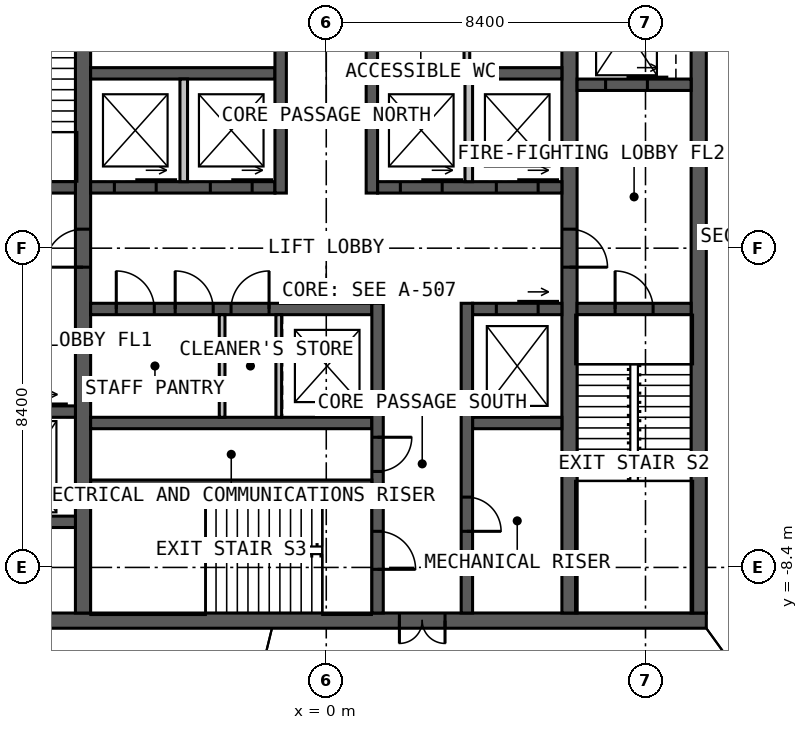
"""IFC4 building model, lengths in metres.
Left out: names, types, materials, properties, quantities, classifications, styles, units other than length and angle.
Written with IfcOpenShell. Run it as: python <this file> out.ifc"""

import sys

from ifc_helpers import new_model, si_unit, direction, frame, frame_2d, origin, place, context, subcontext, project, spatial, rectangle, extrude, element, fill, save


model = new_model("IFC4")
c1 = context("Model", 3, precision=1e-05, world=origin(), true_north=direction((0.0, 1.0)))
c2 = subcontext(c1, "Body", "Model", "MODEL_VIEW")
j1 = project(units=[si_unit("LENGTHUNIT", "METRE"), si_unit("PLANEANGLEUNIT", "RADIAN")], contexts=[c1])
p1 = place(None, origin())
s1 = spatial("IfcSite", under=j1, at=p1, CompositionType="ELEMENT")
p2 = place(p1, origin())
s2 = spatial("IfcBuilding", under=s1, at=p2, CompositionType="ELEMENT")
p3 = place(p2, frame((0.0, 0.0, 236.0)))
s3 = spatial("IfcBuildingStorey", under=s2, at=p3, CompositionType="ELEMENT", Elevation=236.0)
p4 = place(p3, frame((10.0, -9.8, 0.0), z_axis=(0.0, 0.0, 1.0), x_axis=(-1.0, 0.0, 0.0)))
e1 = element("IfcWall", 1, at=p4, inside=s3, PredefinedType="SOLIDWALL", context=c2, shape_type="SweptSolid", body=[
    extrude(rectangle(XDim=20.0, YDim=0.4, at=frame_2d((10.0, 0.0))), origin(), (0.0, 0.0, 1.0), 4.0),
])
p5 = place(p4, frame((6.875, 0.0, 0.0)))
e2 = element("IfcOpeningElement", 2, at=p5, cuts=e1, PredefinedType="OPENING", context=c2, shape_type="SweptSolid", body=[
    extrude(rectangle(XDim=1.2, YDim=2.2, at=frame_2d((0.6, 1.1))), frame((0.0, 0.21, 0.0), z_axis=(0.0, -1.0, 0.0), x_axis=(1.0, 0.0, 0.0)), (0.0, 0.0, 1.0), 0.42),
])
p6 = place(p3, frame((9.8, -9.6, 0.0), z_axis=(0.0, 0.0, 1.0), x_axis=(0.0, 1.0, 0.0)))
e3 = element("IfcWall", 3, at=p6, inside=s3, PredefinedType="SOLIDWALL", context=c2, shape_type="SweptSolid", body=[
    extrude(rectangle(XDim=19.2, YDim=0.4, at=frame_2d((9.6, 0.0))), origin(), (0.0, 0.0, 1.0), 4.0),
])
p7 = place(p3, frame((-6.4, -9.6, 0.0), z_axis=(0.0, 0.0, 1.0), x_axis=(0.0, 1.0, 0.0)))
e4 = element("IfcWall", 4, at=p7, inside=s3, PredefinedType="SOLIDWALL", context=c2, shape_type="SweptSolid", body=[
    extrude(rectangle(XDim=19.2, YDim=0.4, at=frame_2d((9.6, 0.0))), origin(), (0.0, 0.0, 1.0), 4.0),
])
p8 = place(p7, frame((9.1, 0.0, 0.0)))
e5 = element("IfcOpeningElement", 5, at=p8, cuts=e4, PredefinedType="OPENING", context=c2, shape_type="SweptSolid", body=[
    extrude(rectangle(XDim=1.0, YDim=2.2, at=frame_2d((0.5, 1.1))), frame((0.0, 0.21, 0.0), z_axis=(0.0, -1.0, 0.0), x_axis=(1.0, 0.0, 0.0)), (0.0, 0.0, 1.0), 0.42),
])
p9 = place(p3, frame((6.4, 9.6, 0.0), z_axis=(0.0, 0.0, 1.0), x_axis=(0.0, -1.0, 0.0)))
e6 = element("IfcWall", 6, at=p9, inside=s3, PredefinedType="SOLIDWALL", context=c2, shape_type="SweptSolid", body=[
    extrude(rectangle(XDim=19.2, YDim=0.4, at=frame_2d((9.6, 0.0))), origin(), (0.0, 0.0, 1.0), 4.0),
])
p10 = place(p9, frame((9.1, 0.0, 0.0)))
e7 = element("IfcOpeningElement", 7, at=p10, cuts=e6, PredefinedType="OPENING", context=c2, shape_type="SweptSolid", body=[
    extrude(rectangle(XDim=1.0, YDim=2.2, at=frame_2d((0.5, 1.1))), frame((0.0, 0.21, 0.0), z_axis=(0.0, -1.0, 0.0), x_axis=(1.0, 0.0, 0.0)), (0.0, 0.0, 1.0), 0.42),
])
p11 = place(p3, frame((-6.2, 1.6, 0.0), z_axis=(0.0, 0.0, 1.0), x_axis=(1.0, 0.0, 0.0)))
e8 = element("IfcWall", 8, at=p11, inside=s3, PredefinedType="SOLIDWALL", context=c2, shape_type="SweptSolid", body=[
    extrude(rectangle(XDim=4.85, YDim=0.3, at=frame_2d((2.425, 0.0))), origin(), (0.0, 0.0, 1.0), 4.0),
])
p12 = place(p11, frame((0.625, 0.0, 0.0)))
e9 = element("IfcOpeningElement", 9, at=p12, cuts=e8, PredefinedType="OPENING", context=c2, shape_type="SweptSolid", body=[
    extrude(rectangle(XDim=1.1, YDim=2.2, at=frame_2d((0.55, 1.1))), frame((0.0, 0.16, 0.0), z_axis=(0.0, -1.0, 0.0), x_axis=(1.0, 0.0, 0.0)), (0.0, 0.0, 1.0), 0.32),
])
p13 = place(p11, frame((3.15, 0.0, 0.0)))
e10 = element("IfcOpeningElement", 10, at=p13, cuts=e8, PredefinedType="OPENING", context=c2, shape_type="SweptSolid", body=[
    extrude(rectangle(XDim=1.1, YDim=2.2, at=frame_2d((0.55, 1.1))), frame((0.0, 0.16, 0.0), z_axis=(0.0, -1.0, 0.0), x_axis=(1.0, 0.0, 0.0)), (0.0, 0.0, 1.0), 0.32),
])
p14 = place(p3, frame((1.35, 1.6, 0.0), z_axis=(0.0, 0.0, 1.0), x_axis=(1.0, 0.0, 0.0)))
e11 = element("IfcWall", 11, at=p14, inside=s3, PredefinedType="SOLIDWALL", context=c2, shape_type="SweptSolid", body=[
    extrude(rectangle(XDim=4.85, YDim=0.3, at=frame_2d((2.425, 0.0))), origin(), (0.0, 0.0, 1.0), 4.0),
])
p15 = place(p14, frame((0.6, 0.0, 0.0)))
e12 = element("IfcOpeningElement", 12, at=p15, cuts=e11, PredefinedType="OPENING", context=c2, shape_type="SweptSolid", body=[
    extrude(rectangle(XDim=1.1, YDim=2.2, at=frame_2d((0.55, 1.1))), frame((0.0, 0.16, 0.0), z_axis=(0.0, -1.0, 0.0), x_axis=(1.0, 0.0, 0.0)), (0.0, 0.0, 1.0), 0.32),
])
p16 = place(p14, frame((3.125, 0.0, 0.0)))
e13 = element("IfcOpeningElement", 13, at=p16, cuts=e11, PredefinedType="OPENING", context=c2, shape_type="SweptSolid", body=[
    extrude(rectangle(XDim=1.1, YDim=2.2, at=frame_2d((0.55, 1.1))), frame((0.0, 0.16, 0.0), z_axis=(0.0, -1.0, 0.0), x_axis=(1.0, 0.0, 0.0)), (0.0, 0.0, 1.0), 0.32),
])
for number, where, z_axis, x_axis in (
    (14, (-6.2, 4.6, 0.0), (0.0, 0.0, 1.0), (1.0, 0.0, 0.0)),
    (15, (1.35, 4.6, 0.0), (0.0, 0.0, 1.0), (1.0, 0.0, 0.0)),
):
    element("IfcWall", number, at=place(p3, frame(where, z_axis=z_axis, x_axis=x_axis)), inside=s3, PredefinedType="SOLIDWALL", context=c2, shape_type="SweptSolid", body=[
        extrude(rectangle(XDim=4.85, YDim=0.3, at=frame_2d((2.425, 0.0))), origin(), (0.0, 0.0, 1.0), 4.0),
    ])
p17 = place(p3, frame((-1.2, 1.45, 0.0), z_axis=(0.0, 0.0, 1.0), x_axis=(0.0, 1.0, 0.0)))
e16 = element("IfcWall", 16, at=p17, inside=s3, PredefinedType="SOLIDWALL", context=c2, shape_type="SweptSolid", body=[
    extrude(rectangle(XDim=8.15, YDim=0.3, at=frame_2d((4.075, 0.0))), origin(), (0.0, 0.0, 1.0), 4.0),
])
p18 = place(p17, frame((5.05, 0.0, 0.0)))
e17 = element("IfcOpeningElement", 17, at=p18, cuts=e16, PredefinedType="OPENING", context=c2, shape_type="SweptSolid", body=[
    extrude(rectangle(XDim=1.0, YDim=2.2, at=frame_2d((0.5, 1.1))), frame((0.0, 0.16, 0.0), z_axis=(0.0, -1.0, 0.0), x_axis=(1.0, 0.0, 0.0)), (0.0, 0.0, 1.0), 0.32),
])
p19 = place(p3, frame((1.2, 1.45, 0.0), z_axis=(0.0, 0.0, 1.0), x_axis=(0.0, 1.0, 0.0)))
e18 = element("IfcWall", 18, at=p19, inside=s3, PredefinedType="SOLIDWALL", context=c2, shape_type="SweptSolid", body=[
    extrude(rectangle(XDim=8.15, YDim=0.3, at=frame_2d((4.075, 0.0))), origin(), (0.0, 0.0, 1.0), 4.0),
])
p20 = place(p19, frame((3.8, 0.0, 0.0)))
e19 = element("IfcOpeningElement", 19, at=p20, cuts=e18, PredefinedType="OPENING", context=c2, shape_type="SweptSolid", body=[
    extrude(rectangle(XDim=1.0, YDim=2.2, at=frame_2d((0.5, 1.1))), frame((0.0, 0.16, 0.0), z_axis=(0.0, -1.0, 0.0), x_axis=(1.0, 0.0, 0.0)), (0.0, 0.0, 1.0), 0.32),
])
p21 = place(p19, frame((6.15, 0.0, 0.0)))
e20 = element("IfcOpeningElement", 20, at=p21, cuts=e18, PredefinedType="OPENING", context=c2, shape_type="SweptSolid", body=[
    extrude(rectangle(XDim=1.0, YDim=2.2, at=frame_2d((0.5, 1.1))), frame((0.0, 0.16, 0.0), z_axis=(0.0, -1.0, 0.0), x_axis=(1.0, 0.0, 0.0)), (0.0, 0.0, 1.0), 0.32),
])
p22 = place(p3, frame((-6.2, -1.6, 0.0), z_axis=(0.0, 0.0, 1.0), x_axis=(1.0, 0.0, 0.0)))
e21 = element("IfcWall", 21, at=p22, inside=s3, PredefinedType="SOLIDWALL", context=c2, shape_type="SweptSolid", body=[
    extrude(rectangle(XDim=7.4, YDim=0.3, at=frame_2d((3.7, 0.0))), origin(), (0.0, 0.0, 1.0), 4.0),
])
p23 = place(p22, frame((0.675, 0.0, 0.0)))
e22 = element("IfcOpeningElement", 22, at=p23, cuts=e21, PredefinedType="OPENING", context=c2, shape_type="SweptSolid", body=[
    extrude(rectangle(XDim=1.0, YDim=2.2, at=frame_2d((0.5, 1.1))), frame((0.0, 0.16, 0.0), z_axis=(0.0, -1.0, 0.0), x_axis=(1.0, 0.0, 0.0)), (0.0, 0.0, 1.0), 0.32),
])
p24 = place(p22, frame((2.225, 0.0, 0.0)))
e23 = element("IfcOpeningElement", 23, at=p24, cuts=e21, PredefinedType="OPENING", context=c2, shape_type="SweptSolid", body=[
    extrude(rectangle(XDim=1.0, YDim=2.2, at=frame_2d((0.5, 1.1))), frame((0.0, 0.16, 0.0), z_axis=(0.0, -1.0, 0.0), x_axis=(1.0, 0.0, 0.0)), (0.0, 0.0, 1.0), 0.32),
])
p25 = place(p22, frame((3.695, 0.0, 0.0)))
e24 = element("IfcOpeningElement", 24, at=p25, cuts=e21, PredefinedType="OPENING", context=c2, shape_type="SweptSolid", body=[
    extrude(rectangle(XDim=1.0, YDim=2.2, at=frame_2d((0.5, 1.1))), frame((0.0, 0.16, 0.0), z_axis=(0.0, -1.0, 0.0), x_axis=(1.0, 0.0, 0.0)), (0.0, 0.0, 1.0), 0.32),
])
p26 = place(p3, frame((3.85, -1.6, 0.0), z_axis=(0.0, 0.0, 1.0), x_axis=(1.0, 0.0, 0.0)))
e25 = element("IfcWall", 25, at=p26, inside=s3, PredefinedType="SOLIDWALL", context=c2, shape_type="SweptSolid", body=[
    extrude(rectangle(XDim=2.35, YDim=0.3, at=frame_2d((1.175, 0.0))), origin(), (0.0, 0.0, 1.0), 4.0),
])
p27 = place(p26, frame((0.625, 0.0, 0.0)))
e26 = element("IfcOpeningElement", 26, at=p27, cuts=e25, PredefinedType="OPENING", context=c2, shape_type="SweptSolid", body=[
    extrude(rectangle(XDim=1.1, YDim=2.2, at=frame_2d((0.55, 1.1))), frame((0.0, 0.16, 0.0), z_axis=(0.0, -1.0, 0.0), x_axis=(1.0, 0.0, 0.0)), (0.0, 0.0, 1.0), 0.32),
])
p28 = place(p3, frame((-6.2, -4.6, 0.0), z_axis=(0.0, 0.0, 1.0), x_axis=(1.0, 0.0, 0.0)))
e27 = element("IfcWall", 27, at=p28, inside=s3, PredefinedType="SOLIDWALL", context=c2, shape_type="SweptSolid", body=[
    extrude(rectangle(XDim=7.4, YDim=0.3, at=frame_2d((3.7, 0.0))), origin(), (0.0, 0.0, 1.0), 4.0),
])
p29 = place(p3, frame((3.85, -4.6, 0.0), z_axis=(0.0, 0.0, 1.0), x_axis=(1.0, 0.0, 0.0)))
e28 = element("IfcWall", 28, at=p29, inside=s3, PredefinedType="SOLIDWALL", context=c2, shape_type="SweptSolid", body=[
    extrude(rectangle(XDim=2.35, YDim=0.3, at=frame_2d((1.175, 0.0))), origin(), (0.0, 0.0, 1.0), 4.0),
])
p30 = place(p3, frame((1.35, -1.45, 0.0), z_axis=(0.0, 0.0, 1.0), x_axis=(0.0, -1.0, 0.0)))
e29 = element("IfcWall", 29, at=p30, inside=s3, PredefinedType="SOLIDWALL", context=c2, shape_type="SweptSolid", body=[
    extrude(rectangle(XDim=8.15, YDim=0.3, at=frame_2d((4.075, 0.0))), origin(), (0.0, 0.0, 1.0), 4.0),
])
p31 = place(p30, frame((6.0, 0.0, 0.0)))
e30 = element("IfcOpeningElement", 30, at=p31, cuts=e29, PredefinedType="OPENING", context=c2, shape_type="SweptSolid", body=[
    extrude(rectangle(XDim=1.0, YDim=2.2, at=frame_2d((0.5, 1.1))), frame((0.0, 0.16, 0.0), z_axis=(0.0, -1.0, 0.0), x_axis=(1.0, 0.0, 0.0)), (0.0, 0.0, 1.0), 0.32),
])
p32 = place(p30, frame((3.525, 0.0, 0.0)))
e31 = element("IfcOpeningElement", 31, at=p32, cuts=e29, PredefinedType="OPENING", context=c2, shape_type="SweptSolid", body=[
    extrude(rectangle(XDim=0.9, YDim=2.2, at=frame_2d((0.45, 1.1))), frame((0.0, 0.16, 0.0), z_axis=(0.0, -1.0, 0.0), x_axis=(1.0, 0.0, 0.0)), (0.0, 0.0, 1.0), 0.32),
])
p33 = place(p3, frame((3.7, -1.45, 0.0), z_axis=(0.0, 0.0, 1.0), x_axis=(0.0, -1.0, 0.0)))
e32 = element("IfcWall", 32, at=p33, inside=s3, PredefinedType="SOLIDWALL", context=c2, shape_type="SweptSolid", body=[
    extrude(rectangle(XDim=8.15, YDim=0.3, at=frame_2d((4.075, 0.0))), origin(), (0.0, 0.0, 1.0), 4.0),
])
p34 = place(p33, frame((5.1, 0.0, 0.0)))
e33 = element("IfcOpeningElement", 33, at=p34, cuts=e32, PredefinedType="OPENING", context=c2, shape_type="SweptSolid", body=[
    extrude(rectangle(XDim=0.9, YDim=2.2, at=frame_2d((0.45, 1.1))), frame((0.0, 0.16, 0.0), z_axis=(0.0, -1.0, 0.0), x_axis=(1.0, 0.0, 0.0)), (0.0, 0.0, 1.0), 0.32),
])
p35 = place(p3, frame((-6.2, -6.2, 0.0), z_axis=(0.0, 0.0, 1.0), x_axis=(1.0, 0.0, 0.0)))
e34 = element("IfcWall", 34, at=p35, inside=s3, PredefinedType="SOLIDWALL", context=c2, shape_type="SweptSolid", body=[
    extrude(rectangle(XDim=7.4, YDim=0.2, at=frame_2d((3.7, 0.0))), origin(), (0.0, 0.0, 1.0), 4.0),
])
p36 = place(p3, frame((-9.6, 1.6, 0.0), z_axis=(0.0, 0.0, 1.0), x_axis=(1.0, 0.0, 0.0)))
e35 = element("IfcWall", 35, at=p36, inside=s3, PredefinedType="SOLIDWALL", context=c2, shape_type="SweptSolid", body=[
    extrude(rectangle(XDim=3.0, YDim=0.3, at=frame_2d((1.5, 0.0))), origin(), (0.0, 0.0, 1.0), 4.0),
])
p37 = place(p36, frame((1.0, 0.0, 0.0)))
e36 = element("IfcOpeningElement", 36, at=p37, cuts=e35, PredefinedType="OPENING", context=c2, shape_type="SweptSolid", body=[
    extrude(rectangle(XDim=1.0, YDim=2.2, at=frame_2d((0.5, 1.1))), frame((0.0, 0.16, 0.0), z_axis=(0.0, -1.0, 0.0), x_axis=(1.0, 0.0, 0.0)), (0.0, 0.0, 1.0), 0.32),
])
p38 = place(p3, frame((6.6, -1.6, 0.0), z_axis=(0.0, 0.0, 1.0), x_axis=(1.0, 0.0, 0.0)))
e37 = element("IfcWall", 37, at=p38, inside=s3, PredefinedType="SOLIDWALL", context=c2, shape_type="SweptSolid", body=[
    extrude(rectangle(XDim=3.0, YDim=0.3, at=frame_2d((1.5, 0.0))), origin(), (0.0, 0.0, 1.0), 4.0),
])
p39 = place(p38, frame((1.0, 0.0, 0.0)))
e38 = element("IfcOpeningElement", 38, at=p39, cuts=e37, PredefinedType="OPENING", context=c2, shape_type="SweptSolid", body=[
    extrude(rectangle(XDim=1.0, YDim=2.2, at=frame_2d((0.5, 1.1))), frame((0.0, 0.16, 0.0), z_axis=(0.0, -1.0, 0.0), x_axis=(1.0, 0.0, 0.0)), (0.0, 0.0, 1.0), 0.32),
])
p40 = place(p3, frame((-9.6, -4.3, 0.0), z_axis=(0.0, 0.0, 1.0), x_axis=(1.0, 0.0, 0.0)))
e39 = element("IfcWall", 39, at=p40, inside=s3, PredefinedType="SOLIDWALL", context=c2, shape_type="SweptSolid", body=[
    extrude(rectangle(XDim=3.0, YDim=0.3, at=frame_2d((1.5, 0.0))), origin(), (0.0, 0.0, 1.0), 4.0),
])
p41 = place(p40, frame((1.15, 0.0, 0.0)))
e40 = element("IfcOpeningElement", 40, at=p41, cuts=e39, PredefinedType="OPENING", context=c2, shape_type="SweptSolid", body=[
    extrude(rectangle(XDim=1.1, YDim=2.2, at=frame_2d((0.55, 1.1))), frame((0.0, 0.16, 0.0), z_axis=(0.0, -1.0, 0.0), x_axis=(1.0, 0.0, 0.0)), (0.0, 0.0, 1.0), 0.32),
])
p42 = place(p3, frame((6.6, 4.3, 0.0), z_axis=(0.0, 0.0, 1.0), x_axis=(1.0, 0.0, 0.0)))
e41 = element("IfcWall", 41, at=p42, inside=s3, PredefinedType="SOLIDWALL", context=c2, shape_type="SweptSolid", body=[
    extrude(rectangle(XDim=3.0, YDim=0.3, at=frame_2d((1.5, 0.0))), origin(), (0.0, 0.0, 1.0), 4.0),
])
p43 = place(p42, frame((0.75, 0.0, 0.0)))
e42 = element("IfcOpeningElement", 42, at=p43, cuts=e41, PredefinedType="OPENING", context=c2, shape_type="SweptSolid", body=[
    extrude(rectangle(XDim=1.1, YDim=2.2, at=frame_2d((0.55, 1.1))), frame((0.0, 0.16, 0.0), z_axis=(0.0, -1.0, 0.0), x_axis=(1.0, 0.0, 0.0)), (0.0, 0.0, 1.0), 0.32),
])
p44 = place(p3, frame((-9.6, -7.2, 0.0), z_axis=(0.0, 0.0, 1.0), x_axis=(1.0, 0.0, 0.0)))
e43 = element("IfcWall", 43, at=p44, inside=s3, PredefinedType="SOLIDWALL", context=c2, shape_type="SweptSolid", body=[
    extrude(rectangle(XDim=3.0, YDim=0.3, at=frame_2d((1.5, 0.0))), origin(), (0.0, 0.0, 1.0), 4.0),
])
for number, where, z_axis, x_axis in (
    (44, (-3.75, 1.75, 0.0), (0.0, 0.0, 1.0), (0.0, 1.0, 0.0)),
    (45, (3.75, 1.75, 0.0), (0.0, 0.0, 1.0), (0.0, 1.0, 0.0)),
):
    element("IfcWall", number, at=place(p3, frame(where, z_axis=z_axis, x_axis=x_axis)), inside=s3, PredefinedType="SOLIDWALL", context=c2, shape_type="SweptSolid", body=[
        extrude(rectangle(XDim=2.7, YDim=0.2, at=frame_2d((1.35, 0.0))), origin(), (0.0, 0.0, 1.0), 3.75),
    ])
p45 = place(p3, frame((3.7, 4.75, 0.0), z_axis=(0.0, 0.0, 1.0), x_axis=(0.0, 1.0, 0.0)))
e46 = element("IfcWall", 46, at=p45, inside=s3, PredefinedType="PARTITIONING", context=c2, shape_type="SweptSolid", body=[
    extrude(rectangle(XDim=1.975, YDim=0.15, at=frame_2d((0.988, 0.0))), origin(), (0.0, 0.0, 1.0), 3.75),
])
for number, where, z_axis, x_axis in (
    (47, (-2.74, -1.75, 0.0), (0.0, 0.0, 1.0), (0.0, -1.0, 0.0)),
    (48, (-1.25, -1.75, 0.0), (0.0, 0.0, 1.0), (0.0, -1.0, 0.0)),
):
    element("IfcWall", number, at=place(p3, frame(where, z_axis=z_axis, x_axis=x_axis)), inside=s3, PredefinedType="PARTITIONING", context=c2, shape_type="SweptSolid", body=[
        extrude(rectangle(XDim=2.7, YDim=0.15, at=frame_2d((1.35, 0.0))), origin(), (0.0, 0.0, 1.0), 3.75),
    ])
p46 = place(p5, origin())
e49 = element("IfcDoor", 49, at=p46, inside=s3, OperationType="DOUBLE_DOOR_SINGLE_SWING", PredefinedType="DOOR", context=c2, shape_type="SweptSolid", body=[
    extrude(rectangle(XDim=1.2, YDim=2.2, at=frame_2d((0.6, 1.1))), frame((0.0, 0.025, 0.0), z_axis=(0.0, -1.0, 0.0), x_axis=(1.0, 0.0, 0.0)), (0.0, 0.0, 1.0), 0.05),
])
fill(e2, e49)
p47 = place(p8, origin())
e50 = element("IfcDoor", 50, at=p47, inside=s3, OperationType="SINGLE_SWING_LEFT", PredefinedType="DOOR", context=c2, shape_type="SweptSolid", body=[
    extrude(rectangle(XDim=1.0, YDim=2.2, at=frame_2d((0.5, 1.1))), frame((0.0, 0.025, 0.0), z_axis=(0.0, -1.0, 0.0), x_axis=(1.0, 0.0, 0.0)), (0.0, 0.0, 1.0), 0.05),
])
fill(e5, e50)
p48 = place(p10, origin())
e51 = element("IfcDoor", 51, at=p48, inside=s3, OperationType="SINGLE_SWING_RIGHT", PredefinedType="DOOR", context=c2, shape_type="SweptSolid", body=[
    extrude(rectangle(XDim=1.0, YDim=2.2, at=frame_2d((0.5, 1.1))), frame((0.0, 0.025, 0.0), z_axis=(0.0, -1.0, 0.0), x_axis=(1.0, 0.0, 0.0)), (0.0, 0.0, 1.0), 0.05),
])
fill(e7, e51)
p49 = place(p39, origin())
e52 = element("IfcDoor", 52, at=p49, inside=s3, OperationType="SINGLE_SWING_LEFT", PredefinedType="DOOR", context=c2, shape_type="SweptSolid", body=[
    extrude(rectangle(XDim=1.0, YDim=2.2, at=frame_2d((0.5, 1.1))), frame((0.0, 0.025, 0.0), z_axis=(0.0, -1.0, 0.0), x_axis=(1.0, 0.0, 0.0)), (0.0, 0.0, 1.0), 0.05),
])
fill(e38, e52)
p50 = place(p31, origin())
e53 = element("IfcDoor", 53, at=p50, inside=s3, OperationType="SINGLE_SWING_RIGHT", PredefinedType="DOOR", context=c2, shape_type="SweptSolid", body=[
    extrude(rectangle(XDim=1.0, YDim=2.2, at=frame_2d((0.5, 1.1))), frame((0.0, 0.025, 0.0), z_axis=(0.0, -1.0, 0.0), x_axis=(1.0, 0.0, 0.0)), (0.0, 0.0, 1.0), 0.05),
])
fill(e30, e53)
p51 = place(p32, origin())
e54 = element("IfcDoor", 54, at=p51, inside=s3, OperationType="SINGLE_SWING_LEFT", PredefinedType="DOOR", context=c2, shape_type="SweptSolid", body=[
    extrude(rectangle(XDim=0.9, YDim=2.2, at=frame_2d((0.45, 1.1))), frame((0.0, 0.025, 0.0), z_axis=(0.0, -1.0, 0.0), x_axis=(1.0, 0.0, 0.0)), (0.0, 0.0, 1.0), 0.05),
])
fill(e31, e54)
p52 = place(p34, origin())
e55 = element("IfcDoor", 55, at=p52, inside=s3, OperationType="SINGLE_SWING_RIGHT", PredefinedType="DOOR", context=c2, shape_type="SweptSolid", body=[
    extrude(rectangle(XDim=0.9, YDim=2.2, at=frame_2d((0.45, 1.1))), frame((0.0, 0.025, 0.0), z_axis=(0.0, -1.0, 0.0), x_axis=(1.0, 0.0, 0.0)), (0.0, 0.0, 1.0), 0.05),
])
fill(e33, e55)
p53 = place(p23, origin())
e56 = element("IfcDoor", 56, at=p53, inside=s3, OperationType="SINGLE_SWING_LEFT", PredefinedType="DOOR", context=c2, shape_type="SweptSolid", body=[
    extrude(rectangle(XDim=1.0, YDim=2.2, at=frame_2d((0.5, 1.1))), frame((0.0, 0.025, 0.0), z_axis=(0.0, -1.0, 0.0), x_axis=(1.0, 0.0, 0.0)), (0.0, 0.0, 1.0), 0.05),
])
fill(e22, e56)
p54 = place(p24, origin())
e57 = element("IfcDoor", 57, at=p54, inside=s3, OperationType="SINGLE_SWING_LEFT", PredefinedType="DOOR", context=c2, shape_type="SweptSolid", body=[
    extrude(rectangle(XDim=1.0, YDim=2.2, at=frame_2d((0.5, 1.1))), frame((0.0, 0.025, 0.0), z_axis=(0.0, -1.0, 0.0), x_axis=(1.0, 0.0, 0.0)), (0.0, 0.0, 1.0), 0.05),
])
fill(e23, e57)
p55 = place(p25, origin())
e58 = element("IfcDoor", 58, at=p55, inside=s3, OperationType="SINGLE_SWING_RIGHT", PredefinedType="DOOR", context=c2, shape_type="SweptSolid", body=[
    extrude(rectangle(XDim=1.0, YDim=2.2, at=frame_2d((0.5, 1.1))), frame((0.0, 0.025, 0.0), z_axis=(0.0, -1.0, 0.0), x_axis=(1.0, 0.0, 0.0)), (0.0, 0.0, 1.0), 0.05),
])
fill(e24, e58)
p56 = place(p12, origin())
e59 = element("IfcDoor", 59, at=p56, inside=s3, OperationType="SLIDING_TO_LEFT", PredefinedType="DOOR", context=c2, shape_type="SweptSolid", body=[
    extrude(rectangle(XDim=1.1, YDim=2.2, at=frame_2d((0.55, 1.1))), frame((0.0, 0.025, 0.0), z_axis=(0.0, -1.0, 0.0), x_axis=(1.0, 0.0, 0.0)), (0.0, 0.0, 1.0), 0.05),
])
fill(e9, e59)
p57 = place(p13, origin())
e60 = element("IfcDoor", 60, at=p57, inside=s3, OperationType="SLIDING_TO_LEFT", PredefinedType="DOOR", context=c2, shape_type="SweptSolid", body=[
    extrude(rectangle(XDim=1.1, YDim=2.2, at=frame_2d((0.55, 1.1))), frame((0.0, 0.025, 0.0), z_axis=(0.0, -1.0, 0.0), x_axis=(1.0, 0.0, 0.0)), (0.0, 0.0, 1.0), 0.05),
])
fill(e10, e60)
p58 = place(p15, origin())
e61 = element("IfcDoor", 61, at=p58, inside=s3, OperationType="SLIDING_TO_LEFT", PredefinedType="DOOR", context=c2, shape_type="SweptSolid", body=[
    extrude(rectangle(XDim=1.1, YDim=2.2, at=frame_2d((0.55, 1.1))), frame((0.0, 0.025, 0.0), z_axis=(0.0, -1.0, 0.0), x_axis=(1.0, 0.0, 0.0)), (0.0, 0.0, 1.0), 0.05),
])
fill(e12, e61)
p59 = place(p16, origin())
e62 = element("IfcDoor", 62, at=p59, inside=s3, OperationType="SLIDING_TO_LEFT", PredefinedType="DOOR", context=c2, shape_type="SweptSolid", body=[
    extrude(rectangle(XDim=1.1, YDim=2.2, at=frame_2d((0.55, 1.1))), frame((0.0, 0.025, 0.0), z_axis=(0.0, -1.0, 0.0), x_axis=(1.0, 0.0, 0.0)), (0.0, 0.0, 1.0), 0.05),
])
fill(e13, e62)
p60 = place(p27, origin())
e63 = element("IfcDoor", 63, at=p60, inside=s3, OperationType="SLIDING_TO_LEFT", PredefinedType="DOOR", context=c2, shape_type="SweptSolid", body=[
    extrude(rectangle(XDim=1.1, YDim=2.2, at=frame_2d((0.55, 1.1))), frame((0.0, 0.025, 0.0), z_axis=(0.0, -1.0, 0.0), x_axis=(1.0, 0.0, 0.0)), (0.0, 0.0, 1.0), 0.05),
])
fill(e26, e63)
p61 = place(p43, origin())
e64 = element("IfcDoor", 64, at=p61, inside=s3, OperationType="SLIDING_TO_LEFT", PredefinedType="DOOR", context=c2, shape_type="SweptSolid", body=[
    extrude(rectangle(XDim=1.1, YDim=2.2, at=frame_2d((0.55, 1.1))), frame((0.0, 0.025, 0.0), z_axis=(0.0, -1.0, 0.0), x_axis=(1.0, 0.0, 0.0)), (0.0, 0.0, 1.0), 0.05),
])
fill(e42, e64)
save(model, sys.argv[1])
